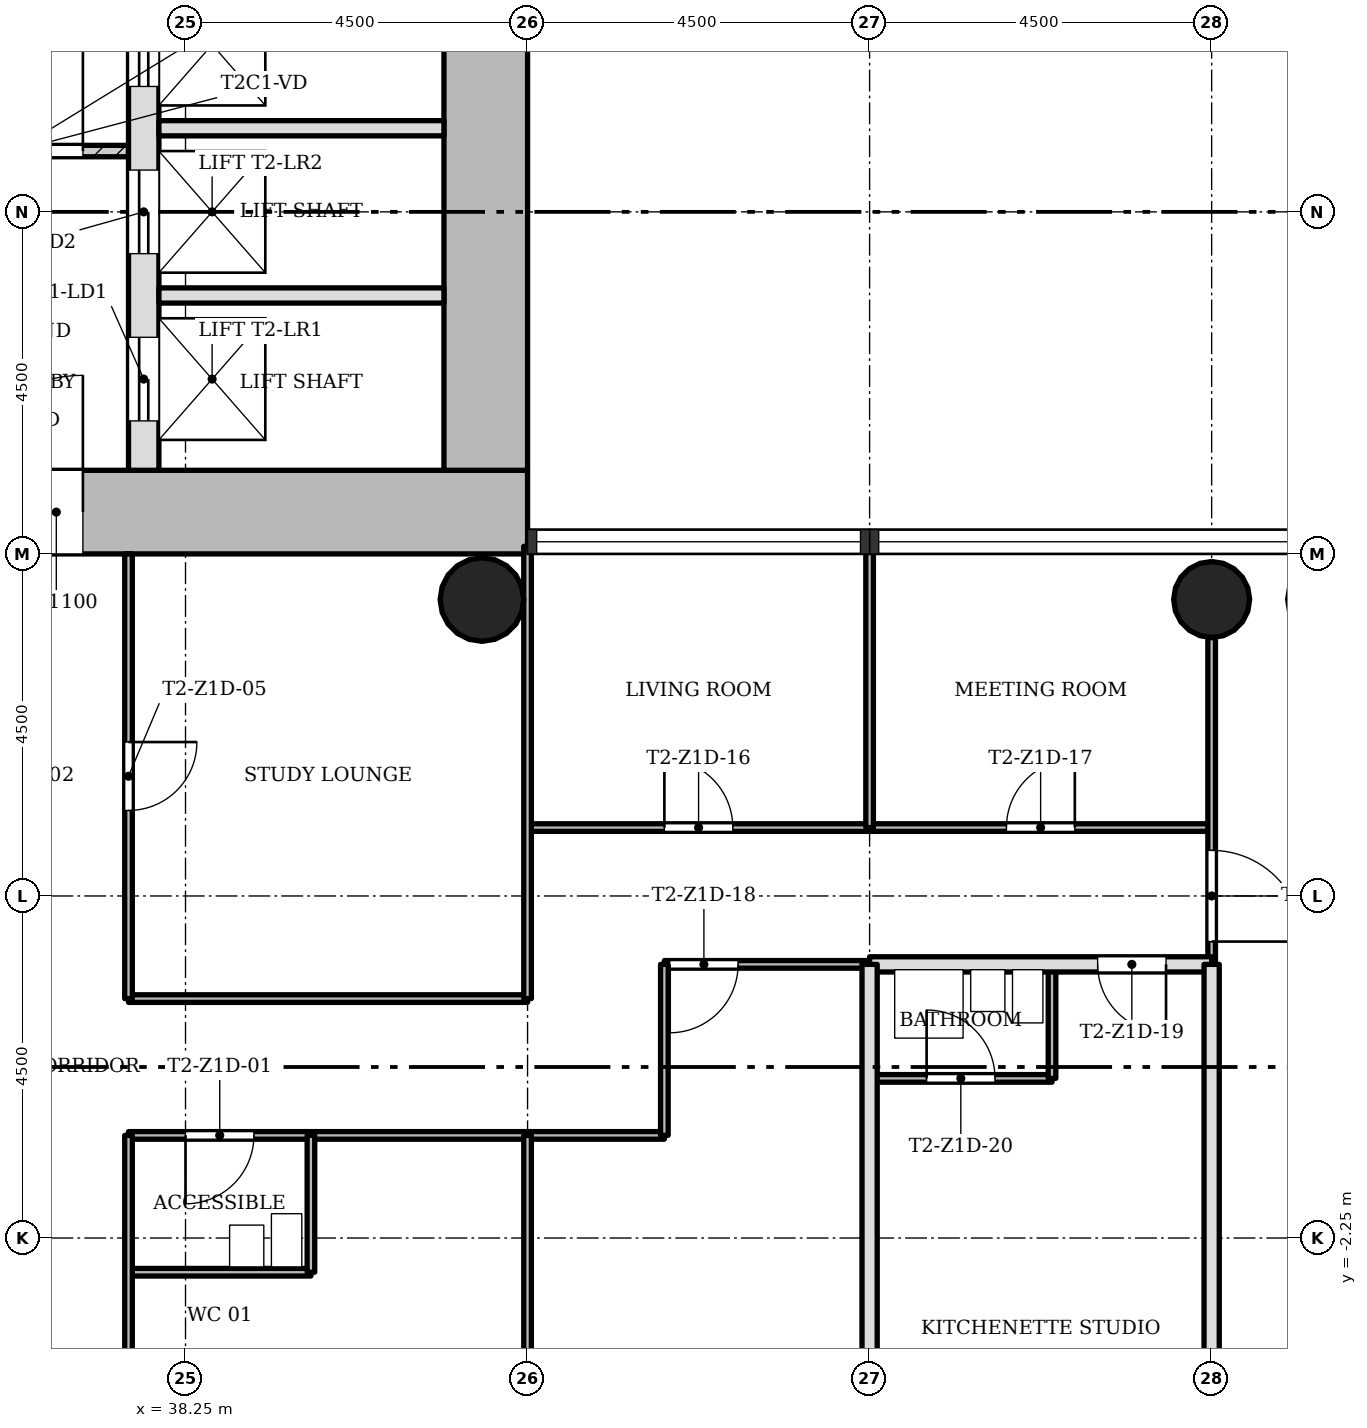
"""IFC4 building model, lengths in metres.
Left out: names, types, materials, properties, quantities, classifications, styles, units other than length and angle.
Written with IfcOpenShell. Run it as: python <this file> out.ifc"""

import sys

from ifc_helpers import new_model, si_unit, direction, frame, frame_2d, origin, origin_2d, place, context, subcontext, project, spatial, rectangle, hollow_circle, extrude, element, fill, save


model = new_model("IFC4")
c1 = context("Model", 3, precision=1e-05, world=origin(), true_north=direction((0.0, 1.0)))
c2 = subcontext(c1, "Body", "Model", "MODEL_VIEW")
j1 = project(units=[si_unit("LENGTHUNIT", "METRE"), si_unit("PLANEANGLEUNIT", "RADIAN")], contexts=[c1])
p1 = place(None, origin())
s1 = spatial("IfcSite", under=j1, at=p1, CompositionType="ELEMENT")
p2 = place(p1, origin())
s2 = spatial("IfcBuilding", under=s1, at=p2, CompositionType="ELEMENT")
p3 = place(p2, frame((0.0, 0.0, 61.9)))
s3 = spatial("IfcBuildingStorey", under=s2, at=p3, CompositionType="ELEMENT", Elevation=61.9)
p4 = place(p3, frame((30.35, 7.3, 0.0), z_axis=(0.0, 0.0, 1.0), x_axis=(1.0, 0.0, 0.0)))
e1 = element("IfcWall", 1, at=p4, inside=s3, PredefinedType="SHEAR", context=c2, shape_type="SweptSolid", body=[
    extrude(rectangle(XDim=12.4, YDim=1.1, at=frame_2d((6.2, 0.0))), origin(), (0.0, 0.0, 1.0), 3.4),
])
p5 = place(p4, frame((4.75, 0.0, 0.0)))
e2 = element("IfcOpeningElement", 2, at=p5, cuts=e1, PredefinedType="OPENING", context=c2, shape_type="SweptSolid", body=[
    extrude(rectangle(XDim=1.8, YDim=2.1, at=frame_2d((0.9, 1.05))), frame((0.0, 0.56, 0.0), z_axis=(0.0, -1.0, 0.0), x_axis=(1.0, 0.0, 0.0)), (0.0, 0.0, 1.0), 1.12),
])
p6 = place(p3, frame((42.2, 7.85, 0.0), z_axis=(0.0, 0.0, 1.0), x_axis=(0.0, 1.0, 0.0)))
e3 = element("IfcWall", 3, at=p6, inside=s3, PredefinedType="SHEAR", context=c2, shape_type="SweptSolid", body=[
    extrude(rectangle(XDim=7.9, YDim=1.1, at=frame_2d((3.95, 0.0))), origin(), (0.0, 0.0, 1.0), 3.4),
])
p7 = place(p3, frame((37.7, 7.85, 0.0), z_axis=(0.0, 0.0, 1.0), x_axis=(0.0, 1.0, 0.0)))
e4 = element("IfcWall", 4, at=p7, inside=s3, PredefinedType="SHEAR", context=c2, shape_type="SweptSolid", body=[
    extrude(rectangle(XDim=6.8, YDim=0.4, at=frame_2d((3.4, 0.0))), origin(), (0.0, 0.0, 1.0), 3.4),
])
p8 = place(p7, frame((0.65, 0.0, 0.0)))
e5 = element("IfcOpeningElement", 5, at=p8, cuts=e4, PredefinedType="OPENING", context=c2, shape_type="SweptSolid", body=[
    extrude(rectangle(XDim=1.1, YDim=2.1, at=frame_2d((0.55, 1.05))), frame((0.0, 0.21, 0.0), z_axis=(0.0, -1.0, 0.0), x_axis=(1.0, 0.0, 0.0)), (0.0, 0.0, 1.0), 0.42),
])
p9 = place(p7, frame((2.85, 0.0, 0.0)))
e6 = element("IfcOpeningElement", 6, at=p9, cuts=e4, PredefinedType="OPENING", context=c2, shape_type="SweptSolid", body=[
    extrude(rectangle(XDim=1.1, YDim=2.1, at=frame_2d((0.55, 1.05))), frame((0.0, 0.21, 0.0), z_axis=(0.0, -1.0, 0.0), x_axis=(1.0, 0.0, 0.0)), (0.0, 0.0, 1.0), 0.42),
])
p10 = place(p7, frame((5.05, 0.0, 0.0)))
e7 = element("IfcOpeningElement", 7, at=p10, cuts=e4, PredefinedType="OPENING", context=c2, shape_type="SweptSolid", body=[
    extrude(rectangle(XDim=1.1, YDim=2.1, at=frame_2d((0.55, 1.05))), frame((0.0, 0.21, 0.0), z_axis=(0.0, -1.0, 0.0), x_axis=(1.0, 0.0, 0.0)), (0.0, 0.0, 1.0), 0.42),
])
p11 = place(p3, frame((51.75, 6.15, 0.0), z_axis=(0.0, 0.0, 1.0), x_axis=(1.0, 0.0, 0.0)))
e8 = element("IfcColumn", 8, at=p11, inside=s3, PredefinedType="COLUMN", context=c2, shape_type="SweptSolid", body=[
    extrude(hollow_circle(Radius=0.5, WallThickness=0.036, at=origin_2d()), origin(), (0.0, 0.0, 1.0), 3.4),
])
p12 = place(p3, frame((42.15, 6.15, 0.0), z_axis=(0.0, 0.0, 1.0), x_axis=(1.0, 0.0, 0.0)))
e9 = element("IfcColumn", 9, at=p12, inside=s3, PredefinedType="COLUMN", context=c2, shape_type="SweptSolid", body=[
    extrude(hollow_circle(Radius=0.55, WallThickness=0.04, at=origin_2d()), origin(), (0.0, 0.0, 1.0), 3.4),
])
p13 = place(p3, frame((37.5, 12.05, 0.0), z_axis=(0.0, 0.0, 1.0), x_axis=(-1.0, 0.0, 0.0)))
e10 = element("IfcWall", 10, at=p13, inside=s3, PredefinedType="PARTITIONING", context=c2, shape_type="SweptSolid", body=[
    extrude(rectangle(XDim=3.0, YDim=0.15, at=frame_2d((1.5, 0.0))), origin(), (0.0, 0.0, 1.0), 3.0),
])
p14 = place(p13, frame((0.6, 0.0, 0.0)))
e11 = element("IfcOpeningElement", 11, at=p14, cuts=e10, PredefinedType="OPENING", context=c2, shape_type="SweptSolid", body=[
    extrude(rectangle(XDim=1.8, YDim=2.1, at=frame_2d((0.9, 1.05))), frame((0.0, 0.085, 0.0), z_axis=(0.0, -1.0, 0.0), x_axis=(1.0, 0.0, 0.0)), (0.0, 0.0, 1.0), 0.17),
])
for number, where, z_axis, x_axis in (
    (12, (41.65, 10.15, 0.0), (0.0, 0.0, 1.0), (-1.0, 0.0, 0.0)),
    (13, (41.65, 12.35, 0.0), (0.0, 0.0, 1.0), (-1.0, 0.0, 0.0)),
):
    element("IfcWall", number, at=place(p3, frame(where, z_axis=z_axis, x_axis=x_axis)), inside=s3, PredefinedType="SOLIDWALL", context=c2, shape_type="SweptSolid", body=[
        extrude(rectangle(XDim=3.75, YDim=0.2, at=frame_2d((1.875, 0.0))), origin(), (0.0, 0.0, 1.0), 3.0),
    ])
p15 = place(p3, frame((39.9, -2.7, 0.0), z_axis=(0.0, 0.0, 1.0), x_axis=(-1.0, 0.0, 0.0)))
e14 = element("IfcWall", 14, at=p15, inside=s3, PredefinedType="PARTITIONING", context=c2, shape_type="SweptSolid", body=[
    extrude(rectangle(XDim=2.4, YDim=0.1, at=frame_2d((1.2, 0.0))), origin(), (0.0, 0.0, 1.0), 3.0),
])
p16 = place(p3, frame((44.55, -0.9, 0.0), z_axis=(0.0, 0.0, 1.0), x_axis=(-1.0, 0.0, 0.0)))
e15 = element("IfcWall", 15, at=p16, inside=s3, PredefinedType="PARTITIONING", context=c2, shape_type="SweptSolid", body=[
    extrude(rectangle(XDim=7.05, YDim=0.1, at=frame_2d((3.525, 0.0))), origin(), (0.0, 0.0, 1.0), 3.0),
])
p17 = place(p16, frame((5.4, 0.0, 0.0)))
e16 = element("IfcOpeningElement", 16, at=p17, cuts=e15, PredefinedType="OPENING", context=c2, shape_type="SweptSolid", body=[
    extrude(rectangle(XDim=0.9, YDim=2.1, at=frame_2d((0.45, 1.05))), frame((0.0, 0.06, 0.0), z_axis=(0.0, -1.0, 0.0), x_axis=(1.0, 0.0, 0.0)), (0.0, 0.0, 1.0), 0.12),
])
p18 = place(p3, frame((49.65, -0.15, 0.0), z_axis=(0.0, 0.0, 1.0), x_axis=(-1.0, 0.0, 0.0)))
e17 = element("IfcWall", 17, at=p18, inside=s3, PredefinedType="PARTITIONING", context=c2, shape_type="SweptSolid", body=[
    extrude(rectangle(XDim=2.4, YDim=0.1, at=frame_2d((1.2, 0.0))), origin(), (0.0, 0.0, 1.0), 3.0),
])
p19 = place(p18, frame((0.75, 0.0, 0.0)))
e18 = element("IfcOpeningElement", 18, at=p19, cuts=e17, PredefinedType="OPENING", context=c2, shape_type="SweptSolid", body=[
    extrude(rectangle(XDim=0.9, YDim=2.1, at=frame_2d((0.45, 1.05))), frame((0.0, 0.06, 0.0), z_axis=(0.0, -1.0, 0.0), x_axis=(1.0, 0.0, 0.0)), (0.0, 0.0, 1.0), 0.12),
])
p20 = place(p3, frame((42.75, 0.9, 0.0), z_axis=(0.0, 0.0, 1.0), x_axis=(-1.0, 0.0, 0.0)))
e19 = element("IfcWall", 19, at=p20, inside=s3, PredefinedType="PARTITIONING", context=c2, shape_type="SweptSolid", body=[
    extrude(rectangle(XDim=5.25, YDim=0.1, at=frame_2d((2.625, 0.0))), origin(), (0.0, 0.0, 1.0), 3.0),
])
p21 = place(p3, frame((47.25, 1.35, 0.0), z_axis=(0.0, 0.0, 1.0), x_axis=(-1.0, 0.0, 0.0)))
e20 = element("IfcWall", 20, at=p21, inside=s3, PredefinedType="PARTITIONING", context=c2, shape_type="SweptSolid", body=[
    extrude(rectangle(XDim=2.7, YDim=0.1, at=frame_2d((1.35, 0.0))), origin(), (0.0, 0.0, 1.0), 3.0),
])
p22 = place(p21, frame((1.73, 0.0, 0.0)))
e21 = element("IfcOpeningElement", 21, at=p22, cuts=e20, PredefinedType="OPENING", context=c2, shape_type="SweptSolid", body=[
    extrude(rectangle(XDim=0.9, YDim=2.1, at=frame_2d((0.45, 1.05))), frame((0.0, 0.06, 0.0), z_axis=(0.0, -1.0, 0.0), x_axis=(1.0, 0.0, 0.0)), (0.0, 0.0, 1.0), 0.12),
])
p23 = place(p3, frame((51.75, 1.35, 0.0), z_axis=(0.0, 0.0, 1.0), x_axis=(-1.0, 0.0, 0.0)))
e22 = element("IfcWall", 22, at=p23, inside=s3, PredefinedType="SOLIDWALL", context=c2, shape_type="SweptSolid", body=[
    extrude(rectangle(XDim=4.5, YDim=0.2, at=frame_2d((2.25, 0.0))), origin(), (0.0, 0.0, 1.0), 3.0),
])
p24 = place(p23, frame((0.6, 0.0, 0.0)))
e23 = element("IfcOpeningElement", 23, at=p24, cuts=e22, PredefinedType="OPENING", context=c2, shape_type="SweptSolid", body=[
    extrude(rectangle(XDim=0.9, YDim=2.1, at=frame_2d((0.45, 1.05))), frame((0.0, 0.11, 0.0), z_axis=(0.0, -1.0, 0.0), x_axis=(1.0, 0.0, 0.0)), (0.0, 0.0, 1.0), 0.22),
])
p25 = place(p3, frame((51.75, 3.15, 0.0), z_axis=(0.0, 0.0, 1.0), x_axis=(-1.0, 0.0, 0.0)))
e24 = element("IfcWall", 24, at=p25, inside=s3, PredefinedType="PARTITIONING", context=c2, shape_type="SweptSolid", body=[
    extrude(rectangle(XDim=9.0, YDim=0.1, at=frame_2d((4.5, 0.0))), origin(), (0.0, 0.0, 1.0), 3.0),
])
p26 = place(p25, frame((6.3, 0.0, 0.0)))
e25 = element("IfcOpeningElement", 25, at=p26, cuts=e24, PredefinedType="OPENING", context=c2, shape_type="SweptSolid", body=[
    extrude(rectangle(XDim=0.9, YDim=2.1, at=frame_2d((0.45, 1.05))), frame((0.0, 0.06, 0.0), z_axis=(0.0, -1.0, 0.0), x_axis=(1.0, 0.0, 0.0)), (0.0, 0.0, 1.0), 0.12),
])
p27 = place(p25, frame((1.8, 0.0, 0.0)))
e26 = element("IfcOpeningElement", 26, at=p27, cuts=e24, PredefinedType="OPENING", context=c2, shape_type="SweptSolid", body=[
    extrude(rectangle(XDim=0.9, YDim=2.1, at=frame_2d((0.45, 1.05))), frame((0.0, 0.06, 0.0), z_axis=(0.0, -1.0, 0.0), x_axis=(1.0, 0.0, 0.0)), (0.0, 0.0, 1.0), 0.12),
])
p28 = place(p3, frame((51.75, 1.35, 0.0), z_axis=(0.0, 0.0, 1.0), x_axis=(0.0, 1.0, 0.0)))
e27 = element("IfcWall", 27, at=p28, inside=s3, PredefinedType="PARTITIONING", context=c2, shape_type="SweptSolid", body=[
    extrude(rectangle(XDim=4.3, YDim=0.1, at=frame_2d((2.15, 0.0))), origin(), (0.0, 0.0, 1.0), 3.0),
])
p29 = place(p28, frame((0.3, 0.0, 0.0)))
e28 = element("IfcOpeningElement", 28, at=p29, cuts=e27, PredefinedType="OPENING", context=c2, shape_type="SweptSolid", body=[
    extrude(rectangle(XDim=1.2, YDim=2.1, at=frame_2d((0.6, 1.05))), frame((0.0, 0.06, 0.0), z_axis=(0.0, -1.0, 0.0), x_axis=(1.0, 0.0, 0.0)), (0.0, 0.0, 1.0), 0.12),
])
p30 = place(p3, frame((51.75, -5.65, 0.0), z_axis=(0.0, 0.0, 1.0), x_axis=(0.0, 1.0, 0.0)))
e29 = element("IfcWall", 29, at=p30, inside=s3, PredefinedType="SOLIDWALL", context=c2, shape_type="SweptSolid", body=[
    extrude(rectangle(XDim=7.0, YDim=0.2, at=frame_2d((3.5, 0.0))), origin(), (0.0, 0.0, 1.0), 3.0),
])
p31 = place(p3, frame((49.65, -0.15, 0.0), z_axis=(0.0, 0.0, 1.0), x_axis=(0.0, 1.0, 0.0)))
e30 = element("IfcWall", 30, at=p31, inside=s3, PredefinedType="PARTITIONING", context=c2, shape_type="SweptSolid", body=[
    extrude(rectangle(XDim=1.5, YDim=0.1, at=frame_2d((0.75, 0.0))), origin(), (0.0, 0.0, 1.0), 3.0),
])
p32 = place(p3, frame((47.25, 3.15, 0.0), z_axis=(0.0, 0.0, 1.0), x_axis=(0.0, 1.0, 0.0)))
e31 = element("IfcWall", 31, at=p32, inside=s3, PredefinedType="PARTITIONING", context=c2, shape_type="SweptSolid", body=[
    extrude(rectangle(XDim=3.7, YDim=0.1, at=frame_2d((1.85, 0.0))), origin(), (0.0, 0.0, 1.0), 3.0),
])
p33 = place(p3, frame((47.25, -6.85, 0.0), z_axis=(0.0, 0.0, 1.0), x_axis=(0.0, 1.0, 0.0)))
e32 = element("IfcWall", 32, at=p33, inside=s3, PredefinedType="SOLIDWALL", context=c2, shape_type="SweptSolid", body=[
    extrude(rectangle(XDim=8.2, YDim=0.2, at=frame_2d((4.1, 0.0))), origin(), (0.0, 0.0, 1.0), 3.0),
])
p34 = place(p3, frame((44.55, -0.9, 0.0), z_axis=(0.0, 0.0, 1.0), x_axis=(0.0, 1.0, 0.0)))
e33 = element("IfcWall", 33, at=p34, inside=s3, PredefinedType="PARTITIONING", context=c2, shape_type="SweptSolid", body=[
    extrude(rectangle(XDim=2.25, YDim=0.1, at=frame_2d((1.125, 0.0))), origin(), (0.0, 0.0, 1.0), 3.0),
])
for number, where, z_axis, x_axis in (
    (34, (42.75, -6.85, 0.0), (0.0, 0.0, 1.0), (0.0, 1.0, 0.0)),
    (35, (42.75, 0.9, 0.0), (0.0, 0.0, 1.0), (0.0, 1.0, 0.0)),
):
    element("IfcWall", number, at=place(p3, frame(where, z_axis=z_axis, x_axis=x_axis)), inside=s3, PredefinedType="PARTITIONING", context=c2, shape_type="SweptSolid", body=[
        extrude(rectangle(XDim=5.95, YDim=0.1, at=frame_2d((2.975, 0.0))), origin(), (0.0, 0.0, 1.0), 3.0),
    ])
p35 = place(p3, frame((39.9, -2.7, 0.0), z_axis=(0.0, 0.0, 1.0), x_axis=(0.0, 1.0, 0.0)))
e36 = element("IfcWall", 36, at=p35, inside=s3, PredefinedType="PARTITIONING", context=c2, shape_type="SweptSolid", body=[
    extrude(rectangle(XDim=1.8, YDim=0.1, at=frame_2d((0.9, 0.0))), origin(), (0.0, 0.0, 1.0), 3.0),
])
p36 = place(p3, frame((37.5, -6.75, 0.0), z_axis=(0.0, 0.0, 1.0), x_axis=(0.0, 1.0, 0.0)))
e37 = element("IfcWall", 37, at=p36, inside=s3, PredefinedType="PARTITIONING", context=c2, shape_type="SweptSolid", body=[
    extrude(rectangle(XDim=5.85, YDim=0.1, at=frame_2d((2.925, 0.0))), origin(), (0.0, 0.0, 1.0), 3.0),
])
p37 = place(p36, frame((1.575, 0.0, 0.0)))
e38 = element("IfcOpeningElement", 38, at=p37, cuts=e37, PredefinedType="OPENING", context=c2, shape_type="SweptSolid", body=[
    extrude(rectangle(XDim=0.9, YDim=2.1, at=frame_2d((0.45, 1.05))), frame((0.0, 0.06, 0.0), z_axis=(0.0, -1.0, 0.0), x_axis=(1.0, 0.0, 0.0)), (0.0, 0.0, 1.0), 0.12),
])
p38 = place(p3, frame((37.5, 0.9, 0.0), z_axis=(0.0, 0.0, 1.0), x_axis=(0.0, 1.0, 0.0)))
e39 = element("IfcWall", 39, at=p38, inside=s3, PredefinedType="PARTITIONING", context=c2, shape_type="SweptSolid", body=[
    extrude(rectangle(XDim=5.85, YDim=0.1, at=frame_2d((2.925, 0.0))), origin(), (0.0, 0.0, 1.0), 3.0),
])
p39 = place(p38, frame((2.475, 0.0, 0.0)))
e40 = element("IfcOpeningElement", 40, at=p39, cuts=e39, PredefinedType="OPENING", context=c2, shape_type="SweptSolid", body=[
    extrude(rectangle(XDim=0.9, YDim=2.1, at=frame_2d((0.45, 1.05))), frame((0.0, 0.06, 0.0), z_axis=(0.0, -1.0, 0.0), x_axis=(1.0, 0.0, 0.0)), (0.0, 0.0, 1.0), 0.12),
])
p40 = place(p14, origin())
e41 = element("IfcDoor", 41, at=p40, inside=s3, OperationType="SINGLE_SWING_LEFT", PredefinedType="DOOR", context=c2, shape_type="SweptSolid", body=[
    extrude(rectangle(XDim=1.8, YDim=2.1, at=frame_2d((0.9, 1.05))), frame((0.0, 0.025, 0.0), z_axis=(0.0, -1.0, 0.0), x_axis=(1.0, 0.0, 0.0)), (0.0, 0.0, 1.0), 0.05),
])
fill(e11, e41)
p41 = place(p17, origin())
e42 = element("IfcDoor", 42, at=p41, inside=s3, OperationType="SINGLE_SWING_LEFT", PredefinedType="DOOR", context=c2, shape_type="SweptSolid", body=[
    extrude(rectangle(XDim=0.9, YDim=2.1, at=frame_2d((0.45, 1.05))), frame((0.0, 0.025, 0.0), z_axis=(0.0, -1.0, 0.0), x_axis=(1.0, 0.0, 0.0)), (0.0, 0.0, 1.0), 0.05),
])
fill(e16, e42)
p42 = place(p39, origin())
e43 = element("IfcDoor", 43, at=p42, inside=s3, OperationType="SINGLE_SWING_RIGHT", PredefinedType="DOOR", context=c2, shape_type="SweptSolid", body=[
    extrude(rectangle(XDim=0.9, YDim=2.1, at=frame_2d((0.45, 1.05))), frame((0.0, 0.025, 0.0), z_axis=(0.0, -1.0, 0.0), x_axis=(1.0, 0.0, 0.0)), (0.0, 0.0, 1.0), 0.05),
])
fill(e40, e43)
p43 = place(p26, origin())
e44 = element("IfcDoor", 44, at=p43, inside=s3, OperationType="SINGLE_SWING_RIGHT", PredefinedType="DOOR", context=c2, shape_type="SweptSolid", body=[
    extrude(rectangle(XDim=0.9, YDim=2.1, at=frame_2d((0.45, 1.05))), frame((0.0, 0.025, 0.0), z_axis=(0.0, -1.0, 0.0), x_axis=(1.0, 0.0, 0.0)), (0.0, 0.0, 1.0), 0.05),
])
fill(e25, e44)
p44 = place(p27, origin())
e45 = element("IfcDoor", 45, at=p44, inside=s3, OperationType="SINGLE_SWING_LEFT", PredefinedType="DOOR", context=c2, shape_type="SweptSolid", body=[
    extrude(rectangle(XDim=0.9, YDim=2.1, at=frame_2d((0.45, 1.05))), frame((0.0, 0.025, 0.0), z_axis=(0.0, -1.0, 0.0), x_axis=(1.0, 0.0, 0.0)), (0.0, 0.0, 1.0), 0.05),
])
fill(e26, e45)
p45 = place(p22, origin())
e46 = element("IfcDoor", 46, at=p45, inside=s3, OperationType="SINGLE_SWING_LEFT", PredefinedType="DOOR", context=c2, shape_type="SweptSolid", body=[
    extrude(rectangle(XDim=0.9, YDim=2.1, at=frame_2d((0.45, 1.05))), frame((0.0, 0.025, 0.0), z_axis=(0.0, -1.0, 0.0), x_axis=(1.0, 0.0, 0.0)), (0.0, 0.0, 1.0), 0.05),
])
fill(e21, e46)
p46 = place(p24, origin())
e47 = element("IfcDoor", 47, at=p46, inside=s3, OperationType="SINGLE_SWING_RIGHT", PredefinedType="DOOR", context=c2, shape_type="SweptSolid", body=[
    extrude(rectangle(XDim=0.9, YDim=2.1, at=frame_2d((0.45, 1.05))), frame((0.0, 0.025, 0.0), z_axis=(0.0, -1.0, 0.0), x_axis=(1.0, 0.0, 0.0)), (0.0, 0.0, 1.0), 0.05),
])
fill(e23, e47)
p47 = place(p19, origin())
e48 = element("IfcDoor", 48, at=p47, inside=s3, OperationType="SINGLE_SWING_RIGHT", PredefinedType="DOOR", context=c2, shape_type="SweptSolid", body=[
    extrude(rectangle(XDim=0.9, YDim=2.1, at=frame_2d((0.45, 1.05))), frame((0.0, 0.025, 0.0), z_axis=(0.0, -1.0, 0.0), x_axis=(1.0, 0.0, 0.0)), (0.0, 0.0, 1.0), 0.05),
])
fill(e18, e48)
p48 = place(p29, origin())
e49 = element("IfcDoor", 49, at=p48, inside=s3, OperationType="SINGLE_SWING_LEFT", PredefinedType="DOOR", context=c2, shape_type="SweptSolid", body=[
    extrude(rectangle(XDim=1.2, YDim=2.1, at=frame_2d((0.6, 1.05))), frame((0.0, 0.025, 0.0), z_axis=(0.0, -1.0, 0.0), x_axis=(1.0, 0.0, 0.0)), (0.0, 0.0, 1.0), 0.05),
])
fill(e28, e49)
p49 = place(p8, origin())
e50 = element("IfcDoor", 50, at=p49, inside=s3, OperationType="SLIDING_TO_LEFT", PredefinedType="DOOR", context=c2, shape_type="SweptSolid", body=[
    extrude(rectangle(XDim=1.1, YDim=2.1, at=frame_2d((0.55, 1.05))), frame((0.0, 0.025, 0.0), z_axis=(0.0, -1.0, 0.0), x_axis=(1.0, 0.0, 0.0)), (0.0, 0.0, 1.0), 0.05),
])
fill(e5, e50)
p50 = place(p9, origin())
e51 = element("IfcDoor", 51, at=p50, inside=s3, OperationType="SLIDING_TO_LEFT", PredefinedType="DOOR", context=c2, shape_type="SweptSolid", body=[
    extrude(rectangle(XDim=1.1, YDim=2.1, at=frame_2d((0.55, 1.05))), frame((0.0, 0.025, 0.0), z_axis=(0.0, -1.0, 0.0), x_axis=(1.0, 0.0, 0.0)), (0.0, 0.0, 1.0), 0.05),
])
fill(e6, e51)
p51 = place(p10, origin())
e52 = element("IfcDoor", 52, at=p51, inside=s3, OperationType="SLIDING_TO_LEFT", PredefinedType="DOOR", context=c2, shape_type="SweptSolid", body=[
    extrude(rectangle(XDim=1.1, YDim=2.1, at=frame_2d((0.55, 1.05))), frame((0.0, 0.025, 0.0), z_axis=(0.0, -1.0, 0.0), x_axis=(1.0, 0.0, 0.0)), (0.0, 0.0, 1.0), 0.05),
])
fill(e7, e52)
p52 = place(p5, origin())
e53 = element("IfcDoor", 53, at=p52, inside=s3, OperationType="SINGLE_SWING_LEFT", PredefinedType="DOOR", context=c2, shape_type="SweptSolid", body=[
    extrude(rectangle(XDim=1.8, YDim=2.1, at=frame_2d((0.9, 1.05))), frame((0.0, 0.025, 0.0), z_axis=(0.0, -1.0, 0.0), x_axis=(1.0, 0.0, 0.0)), (0.0, 0.0, 1.0), 0.05),
])
fill(e2, e53)
save(model, sys.argv[1])
